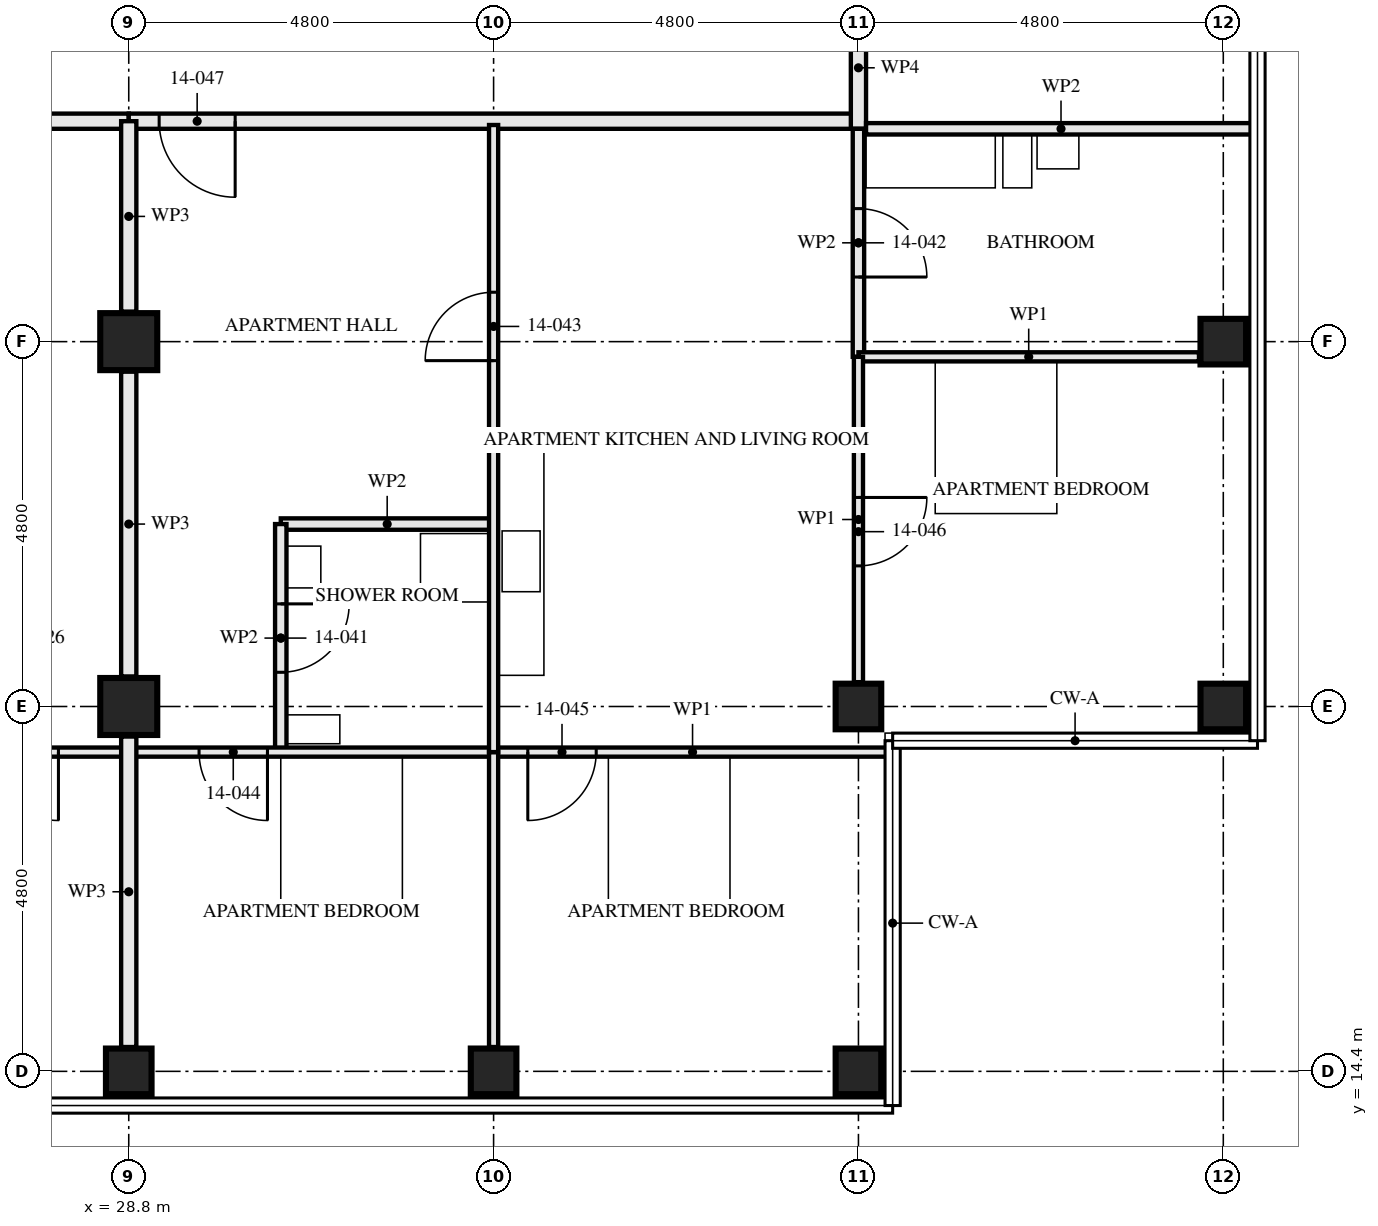
"""IFC4 building model, lengths in metres.
Left out: names, types, materials, properties, quantities, classifications, styles, units other than length and angle.
Written with IfcOpenShell. Run it as: python <this file> out.ifc"""

import sys

from ifc_helpers import new_model, si_unit, direction, frame, frame_2d, origin, origin_2d, place, context, subcontext, project, spatial, rectangle, hollow_rectangle, extrude, element, fill, save


model = new_model("IFC4")
c1 = context("Model", 3, precision=1e-05, world=origin(), true_north=direction((0.0, 1.0)))
c2 = subcontext(c1, "Body", "Model", "MODEL_VIEW")
j1 = project(units=[si_unit("LENGTHUNIT", "METRE"), si_unit("PLANEANGLEUNIT", "RADIAN")], contexts=[c1])
p1 = place(None, origin())
s1 = spatial("IfcSite", under=j1, at=p1, CompositionType="ELEMENT")
p2 = place(p1, origin())
s2 = spatial("IfcBuilding", under=s1, at=p2, CompositionType="ELEMENT")
p3 = place(p2, frame((0.0, 0.0, 55.0)))
s3 = spatial("IfcBuildingStorey", under=s2, at=p3, CompositionType="ELEMENT", Elevation=55.0)
p4 = place(p3, frame((28.8, 14.4, 0.0), z_axis=(0.0, 0.0, 1.0), x_axis=(0.0, 1.0, 0.0)))
e1 = element("IfcColumn", 1, at=p4, inside=s3, PredefinedType="COLUMN", context=c2, shape_type="SweptSolid", body=[
    extrude(hollow_rectangle(XDim=0.6, YDim=0.6, WallThickness=0.08, at=origin_2d()), origin(), (0.0, 0.0, 1.0), 3.5),
])
for number, where, z_axis, x_axis in (
    (2, (28.8, 19.2, 0.0), (0.0, 0.0, 1.0), (1.0, 0.0, 0.0)),
    (3, (28.8, 24.0, 0.0), (0.0, 0.0, 1.0), (1.0, 0.0, 0.0)),
):
    element("IfcColumn", number, at=place(p3, frame(where, z_axis=z_axis, x_axis=x_axis)), inside=s3, PredefinedType="COLUMN", context=c2, shape_type="SweptSolid", body=[
        extrude(hollow_rectangle(XDim=0.75, YDim=0.75, WallThickness=0.08, at=origin_2d()), origin(), (0.0, 0.0, 1.0), 3.5),
    ])
p5 = place(p3, frame((33.6, 14.4, 0.0), z_axis=(0.0, 0.0, 1.0), x_axis=(0.0, 1.0, 0.0)))
e4 = element("IfcColumn", 4, at=p5, inside=s3, PredefinedType="COLUMN", context=c2, shape_type="SweptSolid", body=[
    extrude(hollow_rectangle(XDim=0.6, YDim=0.6, WallThickness=0.08, at=origin_2d()), origin(), (0.0, 0.0, 1.0), 3.5),
])
for number, where, z_axis, x_axis in (
    (5, (38.4, 14.4, 0.0), (0.0, 0.0, 1.0), (0.0, 1.0, 0.0)),
    (6, (38.4, 19.2, 0.0), (0.0, 0.0, 1.0), (0.0, 1.0, 0.0)),
    (7, (43.2, 19.2, 0.0), (0.0, 0.0, 1.0), (0.0, 1.0, 0.0)),
):
    element("IfcColumn", number, at=place(p3, frame(where, z_axis=z_axis, x_axis=x_axis)), inside=s3, PredefinedType="COLUMN", context=c2, shape_type="SweptSolid", body=[
        extrude(hollow_rectangle(XDim=0.6, YDim=0.6, WallThickness=0.06, at=origin_2d()), origin(), (0.0, 0.0, 1.0), 3.5),
    ])
p6 = place(p3, frame((43.2, 24.0, 0.0), z_axis=(0.0, 0.0, 1.0), x_axis=(1.0, 0.0, 0.0)))
e8 = element("IfcColumn", 8, at=p6, inside=s3, PredefinedType="COLUMN", context=c2, shape_type="SweptSolid", body=[
    extrude(hollow_rectangle(XDim=0.6, YDim=0.6, WallThickness=0.08, at=origin_2d()), origin(), (0.0, 0.0, 1.0), 3.5),
])
p7 = place(p3, frame((24.0, 18.6, 0.0), z_axis=(0.0, 0.0, 1.0), x_axis=(1.0, 0.0, 0.0)))
e9 = element("IfcWall", 9, at=p7, inside=s3, PredefinedType="PARTITIONING", context=c2, shape_type="SweptSolid", body=[
    extrude(rectangle(XDim=4.8, YDim=0.12, at=frame_2d((2.4, 0.0))), origin(), (0.0, 0.0, 1.0), 3.33),
])
p8 = place(p7, frame((2.975, 0.0, 0.0)))
e10 = element("IfcOpeningElement", 10, at=p8, cuts=e9, PredefinedType="OPENING", context=c2, shape_type="SweptSolid", body=[
    extrude(rectangle(XDim=0.9, YDim=2.1, at=frame_2d((0.45, 1.05))), frame((0.0, 0.071, 0.0), z_axis=(0.0, -1.0, 0.0), x_axis=(1.0, 0.0, 0.0)), (0.0, 0.0, 1.0), 0.141),
])
p9 = place(p3, frame((14.4, 26.9, 0.0), z_axis=(0.0, 0.0, 1.0), x_axis=(1.0, 0.0, 0.0)))
e11 = element("IfcWall", 11, at=p9, inside=s3, PredefinedType="PARTITIONING", context=c2, shape_type="SweptSolid", body=[
    extrude(rectangle(XDim=14.4, YDim=0.2, at=frame_2d((7.2, 0.0))), origin(), (0.0, 0.0, 1.0), 2.55),
])
p10 = place(p9, frame((1.4, 0.0, 0.0)))
e12 = element("IfcOpeningElement", 12, at=p10, cuts=e11, PredefinedType="OPENING", context=c2, shape_type="SweptSolid", body=[
    extrude(rectangle(XDim=1.0, YDim=2.1, at=frame_2d((0.5, 1.05))), frame((0.0, 0.111, 0.0), z_axis=(0.0, -1.0, 0.0), x_axis=(1.0, 0.0, 0.0)), (0.0, 0.0, 1.0), 0.221),
])
p11 = place(p9, frame((3.65, 0.0, 0.0)))
e13 = element("IfcOpeningElement", 13, at=p11, cuts=e11, PredefinedType="OPENING", context=c2, shape_type="SweptSolid", body=[
    extrude(rectangle(XDim=0.9, YDim=2.1, at=frame_2d((0.45, 1.05))), frame((0.0, 0.111, 0.0), z_axis=(0.0, -1.0, 0.0), x_axis=(1.0, 0.0, 0.0)), (0.0, 0.0, 1.0), 0.221),
])
p12 = place(p9, frame((5.2, 0.0, 0.0)))
e14 = element("IfcOpeningElement", 14, at=p12, cuts=e11, PredefinedType="OPENING", context=c2, shape_type="SweptSolid", body=[
    extrude(rectangle(XDim=1.0, YDim=2.1, at=frame_2d((0.5, 1.05))), frame((0.0, 0.111, 0.0), z_axis=(0.0, -1.0, 0.0), x_axis=(1.0, 0.0, 0.0)), (0.0, 0.0, 1.0), 0.221),
])
p13 = place(p9, frame((10.0, 0.0, 0.0)))
e15 = element("IfcOpeningElement", 15, at=p13, cuts=e11, PredefinedType="OPENING", context=c2, shape_type="SweptSolid", body=[
    extrude(rectangle(XDim=1.0, YDim=2.1, at=frame_2d((0.5, 1.05))), frame((0.0, 0.111, 0.0), z_axis=(0.0, -1.0, 0.0), x_axis=(1.0, 0.0, 0.0)), (0.0, 0.0, 1.0), 0.221),
])
p14 = place(p3, frame((30.8, 18.6, 0.0), z_axis=(0.0, 0.0, 1.0), x_axis=(0.0, 1.0, 0.0)))
e16 = element("IfcWall", 16, at=p14, inside=s3, PredefinedType="PARTITIONING", context=c2, shape_type="SweptSolid", body=[
    extrude(rectangle(XDim=3.0, YDim=0.15, at=frame_2d((1.5, 0.0))), origin(), (0.0, 0.0, 1.0), 2.55),
])
p15 = place(p14, frame((1.05, 0.0, 0.0)))
e17 = element("IfcOpeningElement", 17, at=p15, cuts=e16, PredefinedType="OPENING", context=c2, shape_type="SweptSolid", body=[
    extrude(rectangle(XDim=0.9, YDim=2.1, at=frame_2d((0.45, 1.05))), frame((0.0, 0.085, 0.0), z_axis=(0.0, -1.0, 0.0), x_axis=(1.0, 0.0, 0.0)), (0.0, 0.0, 1.0), 0.171),
])
p16 = place(p3, frame((30.8, 21.6, 0.0), z_axis=(0.0, 0.0, 1.0), x_axis=(1.0, 0.0, 0.0)))
e18 = element("IfcWall", 18, at=p16, inside=s3, PredefinedType="PARTITIONING", context=c2, shape_type="SweptSolid", body=[
    extrude(rectangle(XDim=2.8, YDim=0.15, at=frame_2d((1.4, 0.0))), origin(), (0.0, 0.0, 1.0), 3.33),
])
p17 = place(p3, frame((38.4, 23.8, 0.0), z_axis=(0.0, 0.0, 1.0), x_axis=(0.0, 1.0, 0.0)))
e19 = element("IfcWall", 19, at=p17, inside=s3, PredefinedType="PARTITIONING", context=c2, shape_type="SweptSolid", body=[
    extrude(rectangle(XDim=3.0, YDim=0.15, at=frame_2d((1.5, 0.0))), origin(), (0.0, 0.0, 1.0), 2.55),
])
p18 = place(p17, frame((1.05, 0.0, 0.0)))
e20 = element("IfcOpeningElement", 20, at=p18, cuts=e19, PredefinedType="OPENING", context=c2, shape_type="SweptSolid", body=[
    extrude(rectangle(XDim=0.9, YDim=2.1, at=frame_2d((0.45, 1.05))), frame((0.0, 0.085, 0.0), z_axis=(0.0, -1.0, 0.0), x_axis=(1.0, 0.0, 0.0)), (0.0, 0.0, 1.0), 0.171),
])
p19 = place(p3, frame((33.6, 18.6, 0.0), z_axis=(0.0, 0.0, 1.0), x_axis=(0.0, 1.0, 0.0)))
e21 = element("IfcWall", 21, at=p19, inside=s3, PredefinedType="PARTITIONING", context=c2, shape_type="SweptSolid", body=[
    extrude(rectangle(XDim=8.25, YDim=0.12, at=frame_2d((4.125, 0.0))), origin(), (0.0, 0.0, 1.0), 2.55),
])
p20 = place(p19, frame((5.15, 0.0, 0.0)))
e22 = element("IfcOpeningElement", 22, at=p20, cuts=e21, PredefinedType="OPENING", context=c2, shape_type="SweptSolid", body=[
    extrude(rectangle(XDim=0.9, YDim=2.1, at=frame_2d((0.45, 1.05))), frame((0.0, 0.071, 0.0), z_axis=(0.0, -1.0, 0.0), x_axis=(1.0, 0.0, 0.0)), (0.0, 0.0, 1.0), 0.141),
])
p21 = place(p3, frame((28.8, 18.6, 0.0), z_axis=(0.0, 0.0, 1.0), x_axis=(1.0, 0.0, 0.0)))
e23 = element("IfcWall", 23, at=p21, inside=s3, PredefinedType="PARTITIONING", context=c2, shape_type="SweptSolid", body=[
    extrude(rectangle(XDim=4.8, YDim=0.12, at=frame_2d((2.4, 0.0))), origin(), (0.0, 0.0, 1.0), 3.33),
])
p22 = place(p21, frame((0.925, 0.0, 0.0)))
e24 = element("IfcOpeningElement", 24, at=p22, cuts=e23, PredefinedType="OPENING", context=c2, shape_type="SweptSolid", body=[
    extrude(rectangle(XDim=0.9, YDim=2.1, at=frame_2d((0.45, 1.05))), frame((0.0, 0.071, 0.0), z_axis=(0.0, -1.0, 0.0), x_axis=(1.0, 0.0, 0.0)), (0.0, 0.0, 1.0), 0.141),
])
p23 = place(p3, frame((33.6, 18.6, 0.0), z_axis=(0.0, 0.0, 1.0), x_axis=(1.0, 0.0, 0.0)))
e25 = element("IfcWall", 25, at=p23, inside=s3, PredefinedType="PARTITIONING", context=c2, shape_type="SweptSolid", body=[
    extrude(rectangle(XDim=5.235, YDim=0.12, at=frame_2d((2.617, 0.0))), origin(), (0.0, 0.0, 1.0), 2.32),
])
p24 = place(p23, frame((0.45, 0.0, 0.0)))
e26 = element("IfcOpeningElement", 26, at=p24, cuts=e25, PredefinedType="OPENING", context=c2, shape_type="SweptSolid", body=[
    extrude(rectangle(XDim=0.9, YDim=2.1, at=frame_2d((0.45, 1.05))), frame((0.0, 0.071, 0.0), z_axis=(0.0, -1.0, 0.0), x_axis=(1.0, 0.0, 0.0)), (0.0, 0.0, 1.0), 0.141),
])
p25 = place(p3, frame((38.4, 23.8, 0.0), z_axis=(0.0, 0.0, 1.0), x_axis=(1.0, 0.0, 0.0)))
e27 = element("IfcWall", 27, at=p25, inside=s3, PredefinedType="PARTITIONING", context=c2, shape_type="SweptSolid", body=[
    extrude(rectangle(XDim=4.48, YDim=0.12, at=frame_2d((2.24, 0.0))), origin(), (0.0, 0.0, 1.0), 3.33),
])
p26 = place(p3, frame((33.6, 14.72, 0.0), z_axis=(0.0, 0.0, 1.0), x_axis=(0.0, 1.0, 0.0)))
e28 = element("IfcWall", 28, at=p26, inside=s3, PredefinedType="PARTITIONING", context=c2, shape_type="SweptSolid", body=[
    extrude(rectangle(XDim=3.88, YDim=0.12, at=frame_2d((1.94, 0.0))), origin(), (0.0, 0.0, 1.0), 3.33),
])
p27 = place(p3, frame((38.4, 19.52, 0.0), z_axis=(0.0, 0.0, 1.0), x_axis=(0.0, 1.0, 0.0)))
e29 = element("IfcWall", 29, at=p27, inside=s3, PredefinedType="PARTITIONING", context=c2, shape_type="SweptSolid", body=[
    extrude(rectangle(XDim=4.28, YDim=0.12, at=frame_2d((2.14, 0.0))), origin(), (0.0, 0.0, 1.0), 3.33),
])
p28 = place(p27, frame((1.53, 0.0, 0.0)))
e30 = element("IfcOpeningElement", 30, at=p28, cuts=e29, PredefinedType="OPENING", context=c2, shape_type="SweptSolid", body=[
    extrude(rectangle(XDim=0.9, YDim=2.1, at=frame_2d((0.45, 1.05))), frame((0.0, 0.071, 0.0), z_axis=(0.0, -1.0, 0.0), x_axis=(1.0, 0.0, 0.0)), (0.0, 0.0, 1.0), 0.141),
])
p29 = place(p3, frame((28.8, 26.9, 0.0), z_axis=(0.0, 0.0, 1.0), x_axis=(1.0, 0.0, 0.0)))
e31 = element("IfcWall", 31, at=p29, inside=s3, PredefinedType="PARTITIONING", context=c2, shape_type="SweptSolid", body=[
    extrude(rectangle(XDim=9.6, YDim=0.2, at=frame_2d((4.8, 0.0))), origin(), (0.0, 0.0, 1.0), 3.33),
])
p30 = place(p29, frame((0.4, 0.0, 0.0)))
e32 = element("IfcOpeningElement", 32, at=p30, cuts=e31, PredefinedType="OPENING", context=c2, shape_type="SweptSolid", body=[
    extrude(rectangle(XDim=1.0, YDim=2.1, at=frame_2d((0.5, 1.05))), frame((0.0, 0.111, 0.0), z_axis=(0.0, -1.0, 0.0), x_axis=(1.0, 0.0, 0.0)), (0.0, 0.0, 1.0), 0.221),
])
p31 = place(p3, frame((38.4, 26.8, 0.0), z_axis=(0.0, 0.0, 1.0), x_axis=(0.0, 1.0, 0.0)))
e33 = element("IfcWall", 33, at=p31, inside=s3, PredefinedType="PARTITIONING", context=c2, shape_type="SweptSolid", body=[
    extrude(rectangle(XDim=1.605, YDim=0.2, at=frame_2d((0.802, 0.0))), origin(), (0.0, 0.0, 1.0), 3.33),
])
p32 = place(p3, frame((28.8, 14.72, 0.0), z_axis=(0.0, 0.0, 1.0), x_axis=(0.0, 1.0, 0.0)))
e34 = element("IfcWall", 34, at=p32, inside=s3, PredefinedType="PARTITIONING", context=c2, shape_type="SweptSolid", body=[
    extrude(rectangle(XDim=4.085, YDim=0.2, at=frame_2d((2.042, 0.0))), origin(), (0.0, 0.0, 1.0), 2.32),
])
p33 = place(p3, frame((28.8, 19.595, 0.0), z_axis=(0.0, 0.0, 1.0), x_axis=(0.0, 1.0, 0.0)))
e35 = element("IfcWall", 35, at=p33, inside=s3, PredefinedType="PARTITIONING", context=c2, shape_type="SweptSolid", body=[
    extrude(rectangle(XDim=4.01, YDim=0.2, at=frame_2d((2.005, 0.0))), origin(), (0.0, 0.0, 1.0), 2.32),
])
p34 = place(p3, frame((28.8, 24.395, 0.0), z_axis=(0.0, 0.0, 1.0), x_axis=(0.0, 1.0, 0.0)))
e36 = element("IfcWall", 36, at=p34, inside=s3, PredefinedType="PARTITIONING", context=c2, shape_type="SweptSolid", body=[
    extrude(rectangle(XDim=2.505, YDim=0.2, at=frame_2d((1.252, 0.0))), origin(), (0.0, 0.0, 1.0), 2.32),
])
p35 = place(p3, frame((38.5, 26.8, 0.0), z_axis=(0.0, 0.0, 1.0), x_axis=(1.0, 0.0, 0.0)))
e37 = element("IfcWall", 37, at=p35, inside=s3, PredefinedType="PARTITIONING", context=c2, shape_type="SweptSolid", body=[
    extrude(rectangle(XDim=5.13, YDim=0.15, at=frame_2d((2.565, 0.0))), origin(), (0.0, 0.0, 1.0), 2.32),
])
p36 = place(p8, frame((0.9, 0.0, 0.0), z_axis=(0.0, 0.0, 1.0), x_axis=(-1.0, 0.0, 0.0)))
e38 = element("IfcDoor", 38, at=p36, inside=s3, OperationType="SINGLE_SWING_RIGHT", PredefinedType="DOOR", context=c2, shape_type="SweptSolid", body=[
    extrude(rectangle(XDim=0.9, YDim=2.1, at=frame_2d((0.45, 1.05))), frame((0.0, 0.022, 0.0), z_axis=(0.0, -1.0, 0.0), x_axis=(1.0, 0.0, 0.0)), (0.0, 0.0, 1.0), 0.044),
])
fill(e10, e38)
p37 = place(p15, frame((0.9, 0.0, 0.0), z_axis=(0.0, 0.0, 1.0), x_axis=(-1.0, 0.0, 0.0)))
e39 = element("IfcDoor", 39, at=p37, inside=s3, OperationType="SINGLE_SWING_RIGHT", PredefinedType="DOOR", context=c2, shape_type="SweptSolid", body=[
    extrude(rectangle(XDim=0.9, YDim=2.1, at=frame_2d((0.45, 1.05))), frame((0.0, 0.022, 0.0), z_axis=(0.0, -1.0, 0.0), x_axis=(1.0, 0.0, 0.0)), (0.0, 0.0, 1.0), 0.044),
])
fill(e17, e39)
p38 = place(p18, frame((0.9, 0.0, 0.0), z_axis=(0.0, 0.0, 1.0), x_axis=(-1.0, 0.0, 0.0)))
e40 = element("IfcDoor", 40, at=p38, inside=s3, OperationType="SINGLE_SWING_LEFT", PredefinedType="DOOR", context=c2, shape_type="SweptSolid", body=[
    extrude(rectangle(XDim=0.9, YDim=2.1, at=frame_2d((0.45, 1.05))), frame((0.0, 0.022, 0.0), z_axis=(0.0, -1.0, 0.0), x_axis=(1.0, 0.0, 0.0)), (0.0, 0.0, 1.0), 0.044),
])
fill(e20, e40)
p39 = place(p20, origin())
e41 = element("IfcDoor", 41, at=p39, inside=s3, OperationType="SINGLE_SWING_RIGHT", PredefinedType="DOOR", context=c2, shape_type="SweptSolid", body=[
    extrude(rectangle(XDim=0.9, YDim=2.1, at=frame_2d((0.45, 1.05))), frame((0.0, 0.022, 0.0), z_axis=(0.0, -1.0, 0.0), x_axis=(1.0, 0.0, 0.0)), (0.0, 0.0, 1.0), 0.044),
])
fill(e22, e41)
p40 = place(p22, frame((0.9, 0.0, 0.0), z_axis=(0.0, 0.0, 1.0), x_axis=(-1.0, 0.0, 0.0)))
e42 = element("IfcDoor", 42, at=p40, inside=s3, OperationType="SINGLE_SWING_RIGHT", PredefinedType="DOOR", context=c2, shape_type="SweptSolid", body=[
    extrude(rectangle(XDim=0.9, YDim=2.1, at=frame_2d((0.45, 1.05))), frame((0.0, 0.022, 0.0), z_axis=(0.0, -1.0, 0.0), x_axis=(1.0, 0.0, 0.0)), (0.0, 0.0, 1.0), 0.044),
])
fill(e24, e42)
p41 = place(p24, frame((0.9, 0.0, 0.0), z_axis=(0.0, 0.0, 1.0), x_axis=(-1.0, 0.0, 0.0)))
e43 = element("IfcDoor", 43, at=p41, inside=s3, OperationType="SINGLE_SWING_LEFT", PredefinedType="DOOR", context=c2, shape_type="SweptSolid", body=[
    extrude(rectangle(XDim=0.9, YDim=2.1, at=frame_2d((0.45, 1.05))), frame((0.0, 0.022, 0.0), z_axis=(0.0, -1.0, 0.0), x_axis=(1.0, 0.0, 0.0)), (0.0, 0.0, 1.0), 0.044),
])
fill(e26, e43)
p42 = place(p28, frame((0.9, 0.0, 0.0), z_axis=(0.0, 0.0, 1.0), x_axis=(-1.0, 0.0, 0.0)))
e44 = element("IfcDoor", 44, at=p42, inside=s3, OperationType="SINGLE_SWING_RIGHT", PredefinedType="DOOR", context=c2, shape_type="SweptSolid", body=[
    extrude(rectangle(XDim=0.9, YDim=2.1, at=frame_2d((0.45, 1.05))), frame((0.0, 0.022, 0.0), z_axis=(0.0, -1.0, 0.0), x_axis=(1.0, 0.0, 0.0)), (0.0, 0.0, 1.0), 0.044),
])
fill(e30, e44)
p43 = place(p30, frame((1.0, 0.0, 0.0), z_axis=(0.0, 0.0, 1.0), x_axis=(-1.0, 0.0, 0.0)))
e45 = element("IfcDoor", 45, at=p43, inside=s3, OperationType="SINGLE_SWING_RIGHT", PredefinedType="DOOR", context=c2, shape_type="SweptSolid", body=[
    extrude(rectangle(XDim=1.0, YDim=2.1, at=frame_2d((0.5, 1.05))), frame((0.0, 0.027, 0.0), z_axis=(0.0, -1.0, 0.0), x_axis=(1.0, 0.0, 0.0)), (0.0, 0.0, 1.0), 0.054),
])
fill(e32, e45)
save(model, sys.argv[1])
